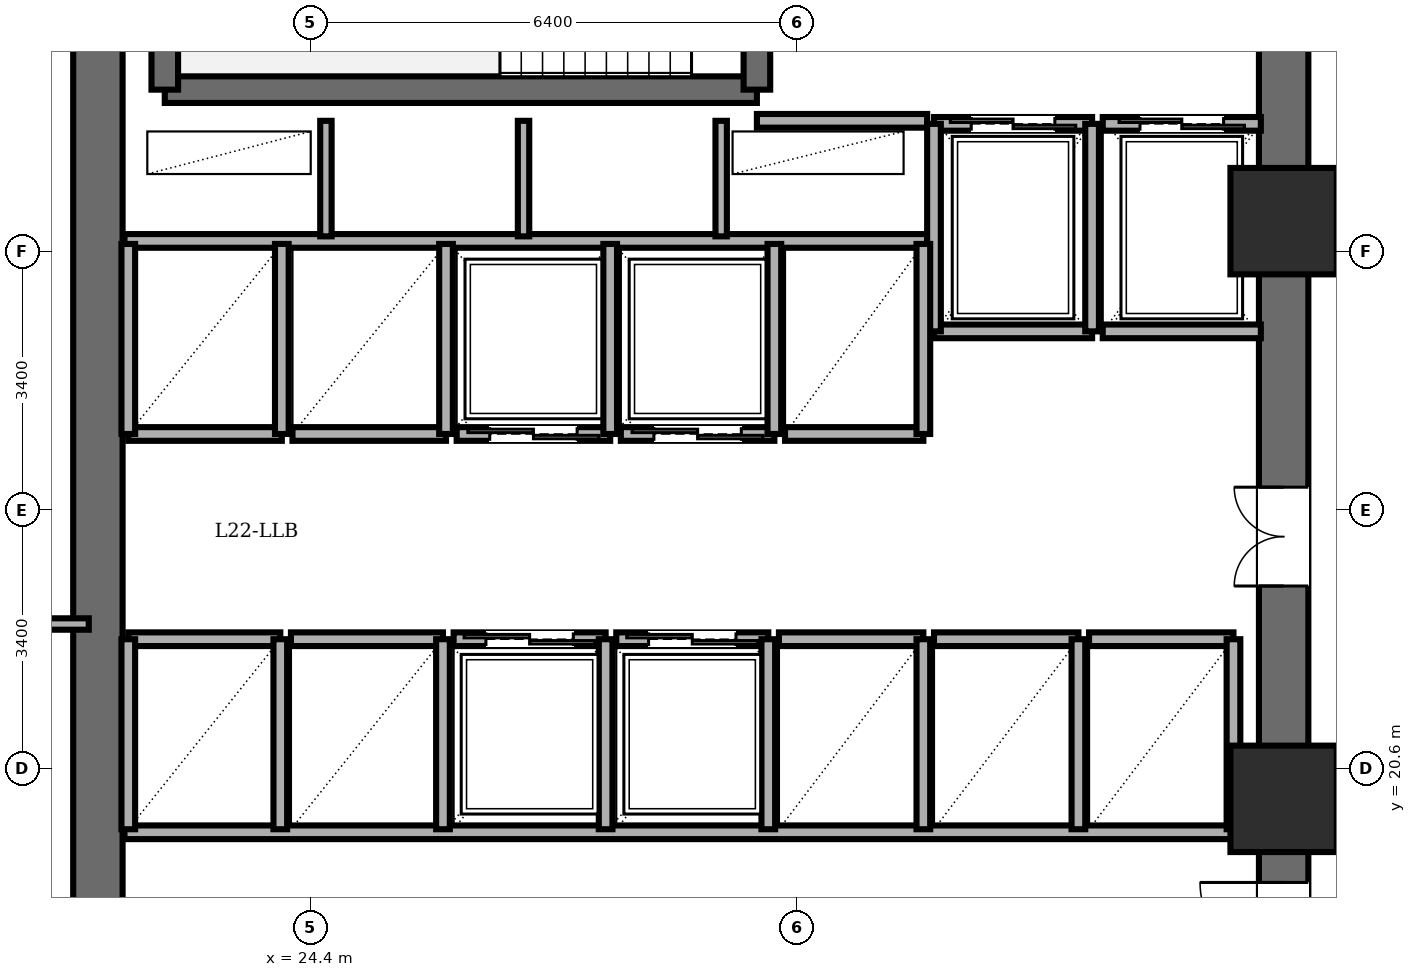
"""IFC4 building model, lengths in metres.
Left out: names, types, materials, properties, quantities, classifications, styles, units other than length and angle.
Written with IfcOpenShell. Run it as: python <this file> out.ifc"""

import sys

from ifc_helpers import new_model, si_unit, direction, frame, frame_2d, origin, origin_2d, place, context, subcontext, project, spatial, rectangle, extrude, element, fill, save


model = new_model("IFC4")
c1 = context("Model", 3, precision=1e-05, world=origin(), true_north=direction((0.0, 1.0)))
c2 = subcontext(c1, "Body", "Model", "MODEL_VIEW")
j1 = project(units=[si_unit("LENGTHUNIT", "METRE"), si_unit("PLANEANGLEUNIT", "RADIAN")], contexts=[c1])
p1 = place(None, origin())
s1 = spatial("IfcSite", under=j1, at=p1, CompositionType="ELEMENT")
p2 = place(p1, origin())
s2 = spatial("IfcBuilding", under=s1, at=p2, CompositionType="ELEMENT")
p3 = place(p2, frame((0.0, 0.0, 86.3)))
s3 = spatial("IfcBuildingStorey", under=s2, at=p3, CompositionType="ELEMENT", Elevation=86.3)
for number, where, z_axis, x_axis in (
    (1, (37.2, 20.2, 0.0), (0.0, 0.0, 1.0), (1.0, 0.0, 0.0)),
    (2, (37.2, 27.8, 0.0), (0.0, 0.0, 1.0), (1.0, 0.0, 0.0)),
):
    element("IfcColumn", number, at=place(p3, frame(where, z_axis=z_axis, x_axis=x_axis)), inside=s3, PredefinedType="COLUMN", context=c2, shape_type="SweptSolid", body=[
        extrude(rectangle(XDim=1.4, YDim=1.4, at=origin_2d()), origin(), (0.0, 0.0, 1.0), 3.6),
    ])
p4 = place(p3, frame((21.6, 14.4, 0.0), z_axis=(0.0, 0.0, 1.0), x_axis=(0.0, 1.0, 0.0)))
e3 = element("IfcWall", 3, at=p4, inside=s3, PredefinedType="SHEAR", context=c2, shape_type="SweptSolid", body=[
    extrude(rectangle(XDim=19.2, YDim=0.65, at=frame_2d((9.6, 0.0))), origin(), (0.0, 0.0, 1.0), 3.4),
])
p5 = place(p3, frame((37.2, 14.4, 0.0), z_axis=(0.0, 0.0, 1.0), x_axis=(0.0, 1.0, 0.0)))
e4 = element("IfcWall", 4, at=p5, inside=s3, PredefinedType="SHEAR", context=c2, shape_type="SweptSolid", body=[
    extrude(rectangle(XDim=19.2, YDim=0.65, at=frame_2d((9.6, 0.0))), origin(), (0.0, 0.0, 1.0), 3.4),
])
p6 = place(p5, frame((15.8, 0.0, 0.0)))
e5 = element("IfcOpeningElement", 5, at=p6, cuts=e4, PredefinedType="OPENING", context=c2, shape_type="SweptSolid", body=[
    extrude(rectangle(XDim=1.15, YDim=2.15, at=frame_2d((0.575, 1.075))), frame((0.0, 0.335, 0.0), z_axis=(0.0, -1.0, 0.0), x_axis=(1.0, 0.0, 0.0)), (0.0, 0.0, 1.0), 0.67),
])
p7 = place(p5, frame((3.6, 0.0, 0.0)))
e6 = element("IfcOpeningElement", 6, at=p7, cuts=e4, PredefinedType="OPENING", context=c2, shape_type="SweptSolid", body=[
    extrude(rectangle(XDim=1.1, YDim=2.15, at=frame_2d((0.55, 1.075))), frame((0.0, 0.335, 0.0), z_axis=(0.0, -1.0, 0.0), x_axis=(1.0, 0.0, 0.0)), (0.0, 0.0, 1.0), 0.67),
])
p8 = place(p5, frame((8.6, 0.0, 0.0)))
e7 = element("IfcOpeningElement", 7, at=p8, cuts=e4, PredefinedType="OPENING", context=c2, shape_type="SweptSolid", body=[
    extrude(rectangle(XDim=1.3, YDim=2.2, at=frame_2d((0.65, 1.1))), frame((0.0, 0.335, 0.0), z_axis=(0.0, -1.0, 0.0), x_axis=(1.0, 0.0, 0.0)), (0.0, 0.0, 1.0), 0.67),
])
p9 = place(p3, frame((22.48, 29.53, 0.0), z_axis=(0.0, 0.0, 1.0), x_axis=(1.0, 0.0, 0.0)))
e8 = element("IfcWall", 8, at=p9, inside=s3, PredefinedType="SOLIDWALL", context=c2, shape_type="SweptSolid", body=[
    extrude(rectangle(XDim=7.79, YDim=0.35, at=frame_2d((3.895, 0.0))), origin(), (0.0, 0.0, 1.0), 3.4),
])
p10 = place(p3, frame((22.48, 29.53, 0.0), z_axis=(0.0, 0.0, 1.0), x_axis=(0.0, 1.0, 0.0)))
e9 = element("IfcWall", 9, at=p10, inside=s3, PredefinedType="SOLIDWALL", context=c2, shape_type="SweptSolid", body=[
    extrude(rectangle(XDim=3.58, YDim=0.35, at=frame_2d((1.79, 0.0))), origin(), (0.0, 0.0, 1.0), 3.4),
])
p11 = place(p3, frame((30.27, 29.53, 0.0), z_axis=(0.0, 0.0, 1.0), x_axis=(0.0, 1.0, 0.0)))
e10 = element("IfcWall", 10, at=p11, inside=s3, PredefinedType="SOLIDWALL", context=c2, shape_type="SweptSolid", body=[
    extrude(rectangle(XDim=3.58, YDim=0.35, at=frame_2d((1.79, 0.0))), origin(), (0.0, 0.0, 1.0), 3.4),
])
p12 = place(p11, frame((1.25, 0.0, 0.0)))
e11 = element("IfcOpeningElement", 11, at=p12, cuts=e10, PredefinedType="OPENING", context=c2, shape_type="SweptSolid", body=[
    extrude(rectangle(XDim=1.1, YDim=2.15, at=frame_2d((0.55, 1.075))), frame((0.0, 0.185, 0.0), z_axis=(0.0, -1.0, 0.0), x_axis=(1.0, 0.0, 0.0)), (0.0, 0.0, 1.0), 0.37),
])
p13 = place(p3, frame((30.27, 29.12, 0.0), z_axis=(0.0, 0.0, 1.0), x_axis=(1.0, 0.0, 0.0)))
e12 = element("IfcWall", 12, at=p13, inside=s3, PredefinedType="PARTITIONING", context=c2, shape_type="SweptSolid", body=[
    extrude(rectangle(XDim=2.24, YDim=0.18, at=frame_2d((1.12, 0.0))), origin(), (0.0, 0.0, 1.0), 3.4),
])
p14 = place(p3, frame((21.95, 27.54, 0.0), z_axis=(0.0, 0.0, 1.0), x_axis=(1.0, 0.0, 0.0)))
e13 = element("IfcWall", 13, at=p14, inside=s3, PredefinedType="PARTITIONING", context=c2, shape_type="SweptSolid", body=[
    extrude(rectangle(XDim=10.56, YDim=0.18, at=frame_2d((5.28, 0.0))), origin(), (0.0, 0.0, 1.0), 3.4),
])
for number, where, z_axis, x_axis in (
    (14, (24.6, 27.6, 0.0), (0.0, 0.0, 1.0), (0.0, 1.0, 0.0)),
    (15, (27.2, 27.6, 0.0), (0.0, 0.0, 1.0), (0.0, 1.0, 0.0)),
    (16, (29.8, 27.6, 0.0), (0.0, 0.0, 1.0), (0.0, 1.0, 0.0)),
):
    element("IfcWall", number, at=place(p3, frame(where, z_axis=z_axis, x_axis=x_axis)), inside=s3, PredefinedType="PARTITIONING", context=c2, shape_type="SweptSolid", body=[
        extrude(rectangle(XDim=1.52, YDim=0.15, at=frame_2d((0.76, 0.0))), origin(), (0.0, 0.0, 1.0), 3.4),
    ])
p15 = place(p3, frame((21.95, 19.76, 0.0), z_axis=(0.0, 0.0, 1.0), x_axis=(1.0, 0.0, 0.0)))
e17 = element("IfcWall", 17, at=p15, inside=s3, PredefinedType="PARTITIONING", context=c2, shape_type="SweptSolid", body=[
    extrude(rectangle(XDim=14.87, YDim=0.18, at=frame_2d((7.435, 0.0))), origin(), (0.0, 0.0, 1.0), 3.4),
])
p16 = place(p3, frame((32.6, 29.08, 0.0), z_axis=(0.0, 0.0, 1.0), x_axis=(1.0, 0.0, 0.0)))
e18 = element("IfcWall", 18, at=p16, inside=s3, PredefinedType="PARTITIONING", context=c2, shape_type="SweptSolid", body=[
    extrude(rectangle(XDim=2.08, YDim=0.18, at=frame_2d((1.04, 0.0))), origin(), (0.0, 0.0, 1.0), 3.4),
])
p17 = place(p16, frame((0.49, 0.0, 0.0)))
e19 = element("IfcOpeningElement", 19, at=p17, cuts=e18, PredefinedType="OPENING", context=c2, shape_type="SweptSolid", body=[
    extrude(rectangle(XDim=1.1, YDim=2.2, at=frame_2d((0.55, 1.1))), frame((0.0, 0.1, 0.0), z_axis=(0.0, -1.0, 0.0), x_axis=(1.0, 0.0, 0.0)), (0.0, 0.0, 1.0), 0.2),
])
p18 = place(p3, frame((34.68, 26.35, 0.0), z_axis=(0.0, 0.0, 1.0), x_axis=(-1.0, 0.0, 0.0)))
e20 = element("IfcWall", 20, at=p18, inside=s3, PredefinedType="PARTITIONING", context=c2, shape_type="SweptSolid", body=[
    extrude(rectangle(XDim=2.08, YDim=0.18, at=frame_2d((1.04, 0.0))), origin(), (0.0, 0.0, 1.0), 3.4),
])
for number, where, z_axis, x_axis in (
    (21, (34.68, 26.35, 0.0), (0.0, 0.0, 1.0), (0.0, 1.0, 0.0)),
    (22, (32.6, 29.08, 0.0), (0.0, 0.0, 1.0), (0.0, -1.0, 0.0)),
):
    element("IfcWall", number, at=place(p3, frame(where, z_axis=z_axis, x_axis=x_axis)), inside=s3, PredefinedType="PARTITIONING", context=c2, shape_type="SweptSolid", body=[
        extrude(rectangle(XDim=2.73, YDim=0.18, at=frame_2d((1.365, 0.0))), origin(), (0.0, 0.0, 1.0), 3.4),
    ])
p19 = place(p3, frame((34.82, 29.08, 0.0), z_axis=(0.0, 0.0, 1.0), x_axis=(1.0, 0.0, 0.0)))
e23 = element("IfcWall", 23, at=p19, inside=s3, PredefinedType="PARTITIONING", context=c2, shape_type="SweptSolid", body=[
    extrude(rectangle(XDim=2.08, YDim=0.18, at=frame_2d((1.04, 0.0))), origin(), (0.0, 0.0, 1.0), 3.4),
])
p20 = place(p19, frame((0.49, 0.0, 0.0)))
e24 = element("IfcOpeningElement", 24, at=p20, cuts=e23, PredefinedType="OPENING", context=c2, shape_type="SweptSolid", body=[
    extrude(rectangle(XDim=1.1, YDim=2.2, at=frame_2d((0.55, 1.1))), frame((0.0, 0.1, 0.0), z_axis=(0.0, -1.0, 0.0), x_axis=(1.0, 0.0, 0.0)), (0.0, 0.0, 1.0), 0.2),
])
p21 = place(p3, frame((36.9, 26.35, 0.0), z_axis=(0.0, 0.0, 1.0), x_axis=(-1.0, 0.0, 0.0)))
e25 = element("IfcWall", 25, at=p21, inside=s3, PredefinedType="PARTITIONING", context=c2, shape_type="SweptSolid", body=[
    extrude(rectangle(XDim=2.08, YDim=0.18, at=frame_2d((1.04, 0.0))), origin(), (0.0, 0.0, 1.0), 3.4),
])
p22 = place(p3, frame((24.02, 25.0, 0.0), z_axis=(0.0, 0.0, 1.0), x_axis=(-1.0, 0.0, 0.0)))
e26 = element("IfcWall", 26, at=p22, inside=s3, PredefinedType="PARTITIONING", context=c2, shape_type="SweptSolid", body=[
    extrude(rectangle(XDim=2.02, YDim=0.18, at=frame_2d((1.01, 0.0))), origin(), (0.0, 0.0, 1.0), 3.4),
])
for number, where, z_axis, x_axis in (
    (27, (24.02, 25.0, 0.0), (0.0, 0.0, 1.0), (0.0, 1.0, 0.0)),
    (28, (22.0, 27.5, 0.0), (0.0, 0.0, 1.0), (0.0, -1.0, 0.0)),
):
    element("IfcWall", number, at=place(p3, frame(where, z_axis=z_axis, x_axis=x_axis)), inside=s3, PredefinedType="PARTITIONING", context=c2, shape_type="SweptSolid", body=[
        extrude(rectangle(XDim=2.5, YDim=0.18, at=frame_2d((1.25, 0.0))), origin(), (0.0, 0.0, 1.0), 3.4),
    ])
p23 = place(p3, frame((26.18, 25.0, 0.0), z_axis=(0.0, 0.0, 1.0), x_axis=(-1.0, 0.0, 0.0)))
e29 = element("IfcWall", 29, at=p23, inside=s3, PredefinedType="PARTITIONING", context=c2, shape_type="SweptSolid", body=[
    extrude(rectangle(XDim=2.02, YDim=0.18, at=frame_2d((1.01, 0.0))), origin(), (0.0, 0.0, 1.0), 3.4),
])
p24 = place(p3, frame((26.18, 25.0, 0.0), z_axis=(0.0, 0.0, 1.0), x_axis=(0.0, 1.0, 0.0)))
e30 = element("IfcWall", 30, at=p24, inside=s3, PredefinedType="PARTITIONING", context=c2, shape_type="SweptSolid", body=[
    extrude(rectangle(XDim=2.5, YDim=0.18, at=frame_2d((1.25, 0.0))), origin(), (0.0, 0.0, 1.0), 3.4),
])
p25 = place(p3, frame((22.0, 22.3, 0.0), z_axis=(0.0, 0.0, 1.0), x_axis=(1.0, 0.0, 0.0)))
e31 = element("IfcWall", 31, at=p25, inside=s3, PredefinedType="PARTITIONING", context=c2, shape_type="SweptSolid", body=[
    extrude(rectangle(XDim=2.0, YDim=0.18, at=frame_2d((1.0, 0.0))), origin(), (0.0, 0.0, 1.0), 3.4),
])
for number, where, z_axis, x_axis in (
    (32, (24.0, 19.8, 0.0), (0.0, 0.0, 1.0), (0.0, 1.0, 0.0)),
    (33, (22.0, 22.3, 0.0), (0.0, 0.0, 1.0), (0.0, -1.0, 0.0)),
):
    element("IfcWall", number, at=place(p3, frame(where, z_axis=z_axis, x_axis=x_axis)), inside=s3, PredefinedType="PARTITIONING", context=c2, shape_type="SweptSolid", body=[
        extrude(rectangle(XDim=2.5, YDim=0.18, at=frame_2d((1.25, 0.0))), origin(), (0.0, 0.0, 1.0), 3.4),
    ])
p26 = place(p3, frame((24.14, 22.3, 0.0), z_axis=(0.0, 0.0, 1.0), x_axis=(1.0, 0.0, 0.0)))
e34 = element("IfcWall", 34, at=p26, inside=s3, PredefinedType="PARTITIONING", context=c2, shape_type="SweptSolid", body=[
    extrude(rectangle(XDim=2.0, YDim=0.18, at=frame_2d((1.0, 0.0))), origin(), (0.0, 0.0, 1.0), 3.4),
])
p27 = place(p3, frame((26.14, 19.8, 0.0), z_axis=(0.0, 0.0, 1.0), x_axis=(0.0, 1.0, 0.0)))
e35 = element("IfcWall", 35, at=p27, inside=s3, PredefinedType="PARTITIONING", context=c2, shape_type="SweptSolid", body=[
    extrude(rectangle(XDim=2.5, YDim=0.18, at=frame_2d((1.25, 0.0))), origin(), (0.0, 0.0, 1.0), 3.4),
])
p28 = place(p3, frame((28.34, 25.0, 0.0), z_axis=(0.0, 0.0, 1.0), x_axis=(-1.0, 0.0, 0.0)))
e36 = element("IfcWall", 36, at=p28, inside=s3, PredefinedType="PARTITIONING", context=c2, shape_type="SweptSolid", body=[
    extrude(rectangle(XDim=2.02, YDim=0.18, at=frame_2d((1.01, 0.0))), origin(), (0.0, 0.0, 1.0), 3.4),
])
p29 = place(p28, frame((0.435, 0.0, 0.0)))
e37 = element("IfcOpeningElement", 37, at=p29, cuts=e36, PredefinedType="OPENING", context=c2, shape_type="SweptSolid", body=[
    extrude(rectangle(XDim=1.15, YDim=2.2, at=frame_2d((0.575, 1.1))), frame((0.0, 0.1, 0.0), z_axis=(0.0, -1.0, 0.0), x_axis=(1.0, 0.0, 0.0)), (0.0, 0.0, 1.0), 0.2),
])
p30 = place(p3, frame((28.34, 25.0, 0.0), z_axis=(0.0, 0.0, 1.0), x_axis=(0.0, 1.0, 0.0)))
e38 = element("IfcWall", 38, at=p30, inside=s3, PredefinedType="PARTITIONING", context=c2, shape_type="SweptSolid", body=[
    extrude(rectangle(XDim=2.5, YDim=0.18, at=frame_2d((1.25, 0.0))), origin(), (0.0, 0.0, 1.0), 3.4),
])
p31 = place(p3, frame((30.5, 25.0, 0.0), z_axis=(0.0, 0.0, 1.0), x_axis=(-1.0, 0.0, 0.0)))
e39 = element("IfcWall", 39, at=p31, inside=s3, PredefinedType="PARTITIONING", context=c2, shape_type="SweptSolid", body=[
    extrude(rectangle(XDim=2.02, YDim=0.18, at=frame_2d((1.01, 0.0))), origin(), (0.0, 0.0, 1.0), 3.4),
])
p32 = place(p31, frame((0.435, 0.0, 0.0)))
e40 = element("IfcOpeningElement", 40, at=p32, cuts=e39, PredefinedType="OPENING", context=c2, shape_type="SweptSolid", body=[
    extrude(rectangle(XDim=1.15, YDim=2.2, at=frame_2d((0.575, 1.1))), frame((0.0, 0.1, 0.0), z_axis=(0.0, -1.0, 0.0), x_axis=(1.0, 0.0, 0.0)), (0.0, 0.0, 1.0), 0.2),
])
p33 = place(p3, frame((30.5, 25.0, 0.0), z_axis=(0.0, 0.0, 1.0), x_axis=(0.0, 1.0, 0.0)))
e41 = element("IfcWall", 41, at=p33, inside=s3, PredefinedType="PARTITIONING", context=c2, shape_type="SweptSolid", body=[
    extrude(rectangle(XDim=2.5, YDim=0.18, at=frame_2d((1.25, 0.0))), origin(), (0.0, 0.0, 1.0), 3.4),
])
p34 = place(p3, frame((26.28, 22.3, 0.0), z_axis=(0.0, 0.0, 1.0), x_axis=(1.0, 0.0, 0.0)))
e42 = element("IfcWall", 42, at=p34, inside=s3, PredefinedType="PARTITIONING", context=c2, shape_type="SweptSolid", body=[
    extrude(rectangle(XDim=2.0, YDim=0.18, at=frame_2d((1.0, 0.0))), origin(), (0.0, 0.0, 1.0), 3.4),
])
p35 = place(p34, frame((0.425, 0.0, 0.0)))
e43 = element("IfcOpeningElement", 43, at=p35, cuts=e42, PredefinedType="OPENING", context=c2, shape_type="SweptSolid", body=[
    extrude(rectangle(XDim=1.15, YDim=2.2, at=frame_2d((0.575, 1.1))), frame((0.0, 0.1, 0.0), z_axis=(0.0, -1.0, 0.0), x_axis=(1.0, 0.0, 0.0)), (0.0, 0.0, 1.0), 0.2),
])
p36 = place(p3, frame((28.28, 19.8, 0.0), z_axis=(0.0, 0.0, 1.0), x_axis=(0.0, 1.0, 0.0)))
e44 = element("IfcWall", 44, at=p36, inside=s3, PredefinedType="PARTITIONING", context=c2, shape_type="SweptSolid", body=[
    extrude(rectangle(XDim=2.5, YDim=0.18, at=frame_2d((1.25, 0.0))), origin(), (0.0, 0.0, 1.0), 3.4),
])
p37 = place(p3, frame((28.42, 22.3, 0.0), z_axis=(0.0, 0.0, 1.0), x_axis=(1.0, 0.0, 0.0)))
e45 = element("IfcWall", 45, at=p37, inside=s3, PredefinedType="PARTITIONING", context=c2, shape_type="SweptSolid", body=[
    extrude(rectangle(XDim=2.0, YDim=0.18, at=frame_2d((1.0, 0.0))), origin(), (0.0, 0.0, 1.0), 3.4),
])
p38 = place(p37, frame((0.425, 0.0, 0.0)))
e46 = element("IfcOpeningElement", 46, at=p38, cuts=e45, PredefinedType="OPENING", context=c2, shape_type="SweptSolid", body=[
    extrude(rectangle(XDim=1.15, YDim=2.2, at=frame_2d((0.575, 1.1))), frame((0.0, 0.1, 0.0), z_axis=(0.0, -1.0, 0.0), x_axis=(1.0, 0.0, 0.0)), (0.0, 0.0, 1.0), 0.2),
])
p39 = place(p3, frame((30.42, 19.8, 0.0), z_axis=(0.0, 0.0, 1.0), x_axis=(0.0, 1.0, 0.0)))
e47 = element("IfcWall", 47, at=p39, inside=s3, PredefinedType="PARTITIONING", context=c2, shape_type="SweptSolid", body=[
    extrude(rectangle(XDim=2.5, YDim=0.18, at=frame_2d((1.25, 0.0))), origin(), (0.0, 0.0, 1.0), 3.4),
])
p40 = place(p3, frame((32.46, 25.0, 0.0), z_axis=(0.0, 0.0, 1.0), x_axis=(-1.0, 0.0, 0.0)))
e48 = element("IfcWall", 48, at=p40, inside=s3, PredefinedType="PARTITIONING", context=c2, shape_type="SweptSolid", body=[
    extrude(rectangle(XDim=1.82, YDim=0.18, at=frame_2d((0.91, 0.0))), origin(), (0.0, 0.0, 1.0), 3.4),
])
p41 = place(p3, frame((32.46, 25.0, 0.0), z_axis=(0.0, 0.0, 1.0), x_axis=(0.0, 1.0, 0.0)))
e49 = element("IfcWall", 49, at=p41, inside=s3, PredefinedType="PARTITIONING", context=c2, shape_type="SweptSolid", body=[
    extrude(rectangle(XDim=2.5, YDim=0.18, at=frame_2d((1.25, 0.0))), origin(), (0.0, 0.0, 1.0), 3.4),
])
p42 = place(p3, frame((30.56, 22.3, 0.0), z_axis=(0.0, 0.0, 1.0), x_axis=(1.0, 0.0, 0.0)))
e50 = element("IfcWall", 50, at=p42, inside=s3, PredefinedType="PARTITIONING", context=c2, shape_type="SweptSolid", body=[
    extrude(rectangle(XDim=1.9, YDim=0.18, at=frame_2d((0.95, 0.0))), origin(), (0.0, 0.0, 1.0), 3.4),
])
p43 = place(p3, frame((32.46, 19.8, 0.0), z_axis=(0.0, 0.0, 1.0), x_axis=(0.0, 1.0, 0.0)))
e51 = element("IfcWall", 51, at=p43, inside=s3, PredefinedType="PARTITIONING", context=c2, shape_type="SweptSolid", body=[
    extrude(rectangle(XDim=2.5, YDim=0.18, at=frame_2d((1.25, 0.0))), origin(), (0.0, 0.0, 1.0), 3.4),
])
p44 = place(p3, frame((32.6, 22.3, 0.0), z_axis=(0.0, 0.0, 1.0), x_axis=(1.0, 0.0, 0.0)))
e52 = element("IfcWall", 52, at=p44, inside=s3, PredefinedType="PARTITIONING", context=c2, shape_type="SweptSolid", body=[
    extrude(rectangle(XDim=1.9, YDim=0.18, at=frame_2d((0.95, 0.0))), origin(), (0.0, 0.0, 1.0), 3.4),
])
p45 = place(p3, frame((34.5, 19.8, 0.0), z_axis=(0.0, 0.0, 1.0), x_axis=(0.0, 1.0, 0.0)))
e53 = element("IfcWall", 53, at=p45, inside=s3, PredefinedType="PARTITIONING", context=c2, shape_type="SweptSolid", body=[
    extrude(rectangle(XDim=2.5, YDim=0.18, at=frame_2d((1.25, 0.0))), origin(), (0.0, 0.0, 1.0), 3.4),
])
p46 = place(p3, frame((34.64, 22.3, 0.0), z_axis=(0.0, 0.0, 1.0), x_axis=(1.0, 0.0, 0.0)))
e54 = element("IfcWall", 54, at=p46, inside=s3, PredefinedType="PARTITIONING", context=c2, shape_type="SweptSolid", body=[
    extrude(rectangle(XDim=1.9, YDim=0.18, at=frame_2d((0.95, 0.0))), origin(), (0.0, 0.0, 1.0), 3.4),
])
p47 = place(p3, frame((36.54, 19.8, 0.0), z_axis=(0.0, 0.0, 1.0), x_axis=(0.0, 1.0, 0.0)))
e55 = element("IfcWall", 55, at=p47, inside=s3, PredefinedType="PARTITIONING", context=c2, shape_type="SweptSolid", body=[
    extrude(rectangle(XDim=2.5, YDim=0.18, at=frame_2d((1.25, 0.0))), origin(), (0.0, 0.0, 1.0), 3.4),
])
p48 = place(p3, frame((8.8, 22.5, 0.0), z_axis=(0.0, 0.0, 1.0), x_axis=(1.0, 0.0, 0.0)))
e56 = element("IfcWall", 56, at=p48, inside=s3, PredefinedType="PARTITIONING", context=c2, shape_type="SweptSolid", body=[
    extrude(rectangle(XDim=12.68, YDim=0.15, at=frame_2d((6.34, 0.0))), origin(), (0.0, 0.0, 1.0), 3.4),
])
p49 = place(p7, origin())
e57 = element("IfcDoor", 57, at=p49, inside=s3, OperationType="SINGLE_SWING_RIGHT", PredefinedType="DOOR", context=c2, shape_type="SweptSolid", body=[
    extrude(rectangle(XDim=1.1, YDim=2.15, at=frame_2d((0.55, 1.075))), frame((0.0, 0.025, 0.0), z_axis=(0.0, -1.0, 0.0), x_axis=(1.0, 0.0, 0.0)), (0.0, 0.0, 1.0), 0.05),
])
fill(e6, e57)
p50 = place(p17, origin())
e58 = element("IfcDoor", 58, at=p50, inside=s3, OperationType="DOUBLE_DOOR_SLIDING", PredefinedType="DOOR", context=c2, shape_type="SweptSolid", body=[
    extrude(rectangle(XDim=1.1, YDim=2.2, at=frame_2d((0.55, 1.1))), frame((0.0, 0.025, 0.0), z_axis=(0.0, -1.0, 0.0), x_axis=(1.0, 0.0, 0.0)), (0.0, 0.0, 1.0), 0.05),
])
fill(e19, e58)
p51 = place(p20, origin())
e59 = element("IfcDoor", 59, at=p51, inside=s3, OperationType="DOUBLE_DOOR_SLIDING", PredefinedType="DOOR", context=c2, shape_type="SweptSolid", body=[
    extrude(rectangle(XDim=1.1, YDim=2.2, at=frame_2d((0.55, 1.1))), frame((0.0, 0.025, 0.0), z_axis=(0.0, -1.0, 0.0), x_axis=(1.0, 0.0, 0.0)), (0.0, 0.0, 1.0), 0.05),
])
fill(e24, e59)
p52 = place(p29, origin())
e60 = element("IfcDoor", 60, at=p52, inside=s3, OperationType="DOUBLE_DOOR_SLIDING", PredefinedType="DOOR", context=c2, shape_type="SweptSolid", body=[
    extrude(rectangle(XDim=1.15, YDim=2.2, at=frame_2d((0.575, 1.1))), frame((0.0, 0.025, 0.0), z_axis=(0.0, -1.0, 0.0), x_axis=(1.0, 0.0, 0.0)), (0.0, 0.0, 1.0), 0.05),
])
fill(e37, e60)
p53 = place(p32, origin())
e61 = element("IfcDoor", 61, at=p53, inside=s3, OperationType="DOUBLE_DOOR_SLIDING", PredefinedType="DOOR", context=c2, shape_type="SweptSolid", body=[
    extrude(rectangle(XDim=1.15, YDim=2.2, at=frame_2d((0.575, 1.1))), frame((0.0, 0.025, 0.0), z_axis=(0.0, -1.0, 0.0), x_axis=(1.0, 0.0, 0.0)), (0.0, 0.0, 1.0), 0.05),
])
fill(e40, e61)
p54 = place(p35, origin())
e62 = element("IfcDoor", 62, at=p54, inside=s3, OperationType="DOUBLE_DOOR_SLIDING", PredefinedType="DOOR", context=c2, shape_type="SweptSolid", body=[
    extrude(rectangle(XDim=1.15, YDim=2.2, at=frame_2d((0.575, 1.1))), frame((0.0, 0.025, 0.0), z_axis=(0.0, -1.0, 0.0), x_axis=(1.0, 0.0, 0.0)), (0.0, 0.0, 1.0), 0.05),
])
fill(e43, e62)
p55 = place(p38, origin())
e63 = element("IfcDoor", 63, at=p55, inside=s3, OperationType="DOUBLE_DOOR_SLIDING", PredefinedType="DOOR", context=c2, shape_type="SweptSolid", body=[
    extrude(rectangle(XDim=1.15, YDim=2.2, at=frame_2d((0.575, 1.1))), frame((0.0, 0.025, 0.0), z_axis=(0.0, -1.0, 0.0), x_axis=(1.0, 0.0, 0.0)), (0.0, 0.0, 1.0), 0.05),
])
fill(e46, e63)
p56 = place(p8, origin())
e64 = element("IfcDoor", 64, at=p56, inside=s3, OperationType="DOUBLE_DOOR_SINGLE_SWING", PredefinedType="DOOR", context=c2, shape_type="SweptSolid", body=[
    extrude(rectangle(XDim=1.3, YDim=2.2, at=frame_2d((0.65, 1.1))), frame((0.0, 0.025, 0.0), z_axis=(0.0, -1.0, 0.0), x_axis=(1.0, 0.0, 0.0)), (0.0, 0.0, 1.0), 0.05),
])
fill(e7, e64)
save(model, sys.argv[1])
